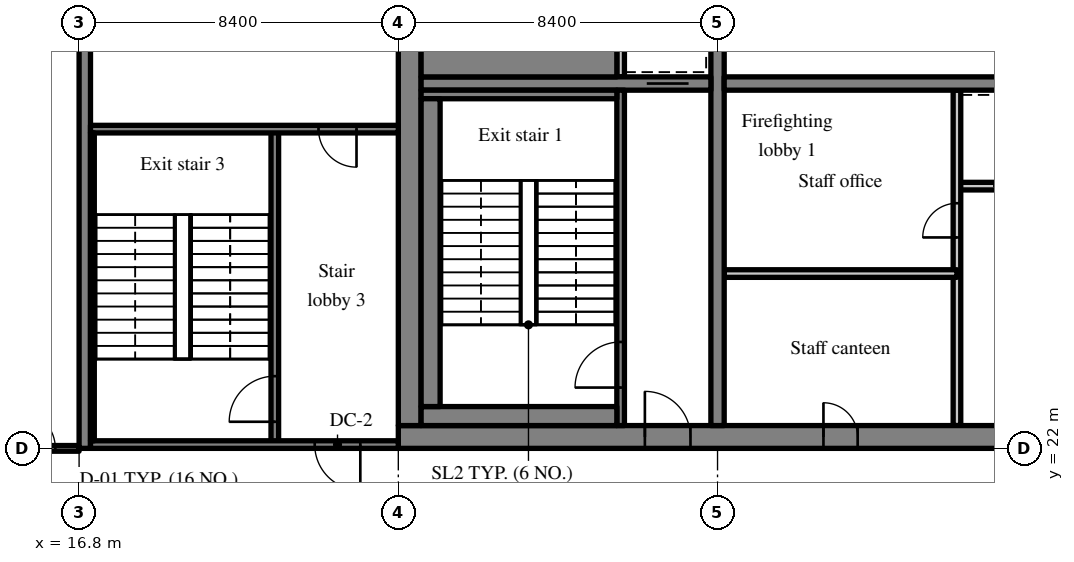
"""IFC4 building model, lengths in metres.
Left out: names, types, materials, properties, quantities, classifications, styles, units other than length and angle.
Written with IfcOpenShell. Run it as: python <this file> out.ifc"""

import sys

from ifc_helpers import new_model, si_unit, direction, frame, frame_2d, origin, place, context, subcontext, project, spatial, rectangle, extrude, source, transform, mapped, element, fill, save


model = new_model("IFC4")
c1 = context("Model", 3, precision=1e-05, world=origin(), true_north=direction((0.0, 1.0)))
c2 = subcontext(c1, "Body", "Model", "MODEL_VIEW")
j1 = project(units=[si_unit("LENGTHUNIT", "METRE"), si_unit("PLANEANGLEUNIT", "RADIAN")], contexts=[c1])
p1 = place(None, origin())
s1 = spatial("IfcSite", under=j1, at=p1, CompositionType="ELEMENT")
p2 = place(p1, origin())
s2 = spatial("IfcBuilding", under=s1, at=p2, CompositionType="ELEMENT")
p3 = place(p2, frame((0.0, 0.0, 229.6)))
s3 = spatial("IfcBuildingStorey", under=s2, at=p3, CompositionType="ELEMENT", Elevation=229.6)
m1 = source(origin(), c2, "Body", "SweptSolid", [
    extrude(rectangle(XDim=50.4, YDim=0.6, at=frame_2d((25.2, 0.0))), origin(), (0.0, 0.0, 1.0), 3.62),
])
p4 = place(p3, frame((25.2, 22.3, 0.0), z_axis=(0.0, 0.0, 1.0), x_axis=(1.0, 0.0, 0.0)))
e1 = element("IfcWall", 1, at=p4, inside=s3, PredefinedType="SHEAR", context=c2, shape_type="MappedRepresentation", body=[
    mapped(m1, transform((0.0, 0.0, 0.0), scale=1.0)),
])
m2 = source(origin(), c2, "Body", "SweptSolid", [
    extrude(rectangle(XDim=1.8, YDim=2.1, at=frame_2d((0.9, 1.05))), frame((0.0, 0.31, 0.0), z_axis=(0.0, -1.0, 0.0), x_axis=(1.0, 0.0, 0.0)), (0.0, 0.0, 1.0), 0.62),
])
p5 = place(p4, frame((15.9, 0.0, 0.0)))
e2 = element("IfcOpeningElement", 2, at=p5, cuts=e1, PredefinedType="OPENING", context=c2, shape_type="MappedRepresentation", body=[
    mapped(m2, transform((0.0, 0.0, 0.0), scale=1.0)),
])
m3 = source(origin(), c2, "Body", "SweptSolid", [
    extrude(rectangle(XDim=0.9, YDim=2.1, at=frame_2d((0.45, 1.05))), frame((0.0, 0.31, 0.0), z_axis=(0.0, -1.0, 0.0), x_axis=(1.0, 0.0, 0.0)), (0.0, 0.0, 1.0), 0.62),
])
p6 = place(p4, frame((11.187, 0.0, 0.0)))
e3 = element("IfcOpeningElement", 3, at=p6, cuts=e1, PredefinedType="OPENING", context=c2, shape_type="MappedRepresentation", body=[
    mapped(m3, transform((0.0, 0.0, 0.0), scale=1.0)),
])
p7 = place(p4, frame((21.513, 0.0, 0.0)))
e4 = element("IfcOpeningElement", 4, at=p7, cuts=e1, PredefinedType="OPENING", context=c2, shape_type="MappedRepresentation", body=[
    mapped(m3, transform((0.0, 0.0, 0.0), scale=1.0)),
])
p8 = place(p4, frame((32.7, 0.0, 0.0)))
e5 = element("IfcOpeningElement", 5, at=p8, cuts=e1, PredefinedType="OPENING", context=c2, shape_type="MappedRepresentation", body=[
    mapped(m2, transform((0.0, 0.0, 0.0), scale=1.0)),
])
m4 = source(origin(), c2, "Body", "SweptSolid", [
    extrude(rectangle(XDim=1.2, YDim=2.1, at=frame_2d((0.6, 1.05))), frame((0.0, 0.31, 0.0), z_axis=(0.0, -1.0, 0.0), x_axis=(1.0, 0.0, 0.0)), (0.0, 0.0, 1.0), 0.62),
])
p9 = place(p4, frame((6.488, 0.0, 0.0)))
e6 = element("IfcOpeningElement", 6, at=p9, cuts=e1, PredefinedType="OPENING", context=c2, shape_type="MappedRepresentation", body=[
    mapped(m4, transform((0.0, 0.0, 0.0), scale=1.0)),
])
p10 = place(p4, frame((47.925, 0.0, 0.0)))
e7 = element("IfcOpeningElement", 7, at=p10, cuts=e1, PredefinedType="OPENING", context=c2, shape_type="MappedRepresentation", body=[
    mapped(m4, transform((0.0, 0.0, 0.0), scale=1.0)),
])
m5 = source(origin(), c2, "Body", "SweptSolid", [
    extrude(rectangle(XDim=18.8, YDim=0.6, at=frame_2d((9.4, 0.0))), origin(), (0.0, 0.0, 1.0), 3.62),
])
p11 = place(p3, frame((25.5, 22.6, 0.0), z_axis=(0.0, 0.0, 1.0), x_axis=(0.0, 1.0, 0.0)))
e8 = element("IfcWall", 8, at=p11, inside=s3, PredefinedType="SHEAR", context=c2, shape_type="MappedRepresentation", body=[
    mapped(m5, transform((0.0, 0.0, 0.0), scale=1.0)),
])
m6 = source(origin(), c2, "Body", "SweptSolid", [
    extrude(rectangle(XDim=18.8, YDim=0.35, at=frame_2d((9.4, 0.0))), origin(), (0.0, 0.0, 1.0), 3.62),
])
p12 = place(p3, frame((33.6, 22.6, 0.0), z_axis=(0.0, 0.0, 1.0), x_axis=(0.0, 1.0, 0.0)))
e9 = element("IfcWall", 9, at=p12, inside=s3, PredefinedType="SHEAR", context=c2, shape_type="MappedRepresentation", body=[
    mapped(m6, transform((0.0, 0.0, 0.0), scale=1.0)),
])
m7 = source(origin(), c2, "Body", "SweptSolid", [
    extrude(rectangle(XDim=1.1, YDim=2.1, at=frame_2d((0.55, 1.05))), frame((0.0, 0.185, 0.0), z_axis=(0.0, -1.0, 0.0), x_axis=(1.0, 0.0, 0.0)), (0.0, 0.0, 1.0), 0.37),
])
p13 = place(p12, frame((12.85, 0.0, 0.0)))
e10 = element("IfcOpeningElement", 10, at=p13, cuts=e9, PredefinedType="OPENING", context=c2, shape_type="MappedRepresentation", body=[
    mapped(m7, transform((0.0, 0.0, 0.0), scale=1.0)),
])
m8 = source(origin(), c2, "Body", "SweptSolid", [
    extrude(rectangle(XDim=7.625, YDim=0.35, at=frame_2d((3.812, 0.0))), origin(), (0.0, 0.0, 1.0), 3.62),
])
p14 = place(p3, frame((25.8, 31.6, 0.0), z_axis=(0.0, 0.0, 1.0), x_axis=(1.0, 0.0, 0.0)))
e11 = element("IfcWall", 11, at=p14, inside=s3, PredefinedType="SHEAR", context=c2, shape_type="MappedRepresentation", body=[
    mapped(m8, transform((0.0, 0.0, 0.0), scale=1.0)),
])
p15 = place(p14, frame((5.938, 0.0, 0.0)))
e12 = element("IfcOpeningElement", 12, at=p15, cuts=e11, PredefinedType="OPENING", context=c2, shape_type="MappedRepresentation", body=[
    mapped(m7, transform((0.0, 0.0, 0.0), scale=1.0)),
])
m9 = source(origin(), c2, "Body", "SweptSolid", [
    extrude(rectangle(XDim=16.45, YDim=0.35, at=frame_2d((8.225, 0.0))), origin(), (0.0, 0.0, 1.0), 3.62),
])
p16 = place(p3, frame((33.775, 31.6, 0.0), z_axis=(0.0, 0.0, 1.0), x_axis=(1.0, 0.0, 0.0)))
e13 = element("IfcWall", 13, at=p16, inside=s3, PredefinedType="SHEAR", context=c2, shape_type="MappedRepresentation", body=[
    mapped(m9, transform((0.0, 0.0, 0.0), scale=1.0)),
])
m10 = source(origin(), c2, "Body", "SweptSolid", [
    extrude(rectangle(XDim=1.0, YDim=2.1, at=frame_2d((0.5, 1.05))), frame((0.0, 0.185, 0.0), z_axis=(0.0, -1.0, 0.0), x_axis=(1.0, 0.0, 0.0)), (0.0, 0.0, 1.0), 0.37),
])
p17 = place(p16, frame((14.837, 0.0, 0.0)))
e14 = element("IfcOpeningElement", 14, at=p17, cuts=e13, PredefinedType="OPENING", context=c2, shape_type="MappedRepresentation", body=[
    mapped(m10, transform((0.0, 0.0, 0.0), scale=1.0)),
])
m11 = source(origin(), c2, "Body", "SweptSolid", [
    extrude(rectangle(XDim=18.4, YDim=0.3, at=frame_2d((9.2, 0.0))), origin(), (0.0, 0.0, 1.0), 3.62),
])
p18 = place(p3, frame((16.95, 22.0, 0.0), z_axis=(0.0, 0.0, 1.0), x_axis=(0.0, 1.0, 0.0)))
e15 = element("IfcWall", 15, at=p18, inside=s3, PredefinedType="SHEAR", context=c2, shape_type="MappedRepresentation", body=[
    mapped(m11, transform((0.0, 0.0, 0.0), scale=1.0)),
])
m12 = source(origin(), c2, "Body", "SweptSolid", [
    extrude(rectangle(XDim=6.0, YDim=0.2, at=frame_2d((3.0, 0.0))), origin(), (0.0, 0.0, 1.0), 3.62),
])
p19 = place(p3, frame((39.9, 28.9, 0.0), z_axis=(0.0, 0.0, 1.0), x_axis=(1.0, 0.0, 0.0)))
e16 = element("IfcWall", 16, at=p19, inside=s3, PredefinedType="SOLIDWALL", context=c2, shape_type="MappedRepresentation", body=[
    mapped(m12, transform((0.0, 0.0, 0.0), scale=1.0)),
])
m13 = source(origin(), c2, "Body", "SweptSolid", [
    extrude(rectangle(XDim=1.1, YDim=2.1, at=frame_2d((0.55, 1.05))), frame((0.0, 0.11, 0.0), z_axis=(0.0, -1.0, 0.0), x_axis=(1.0, 0.0, 0.0)), (0.0, 0.0, 1.0), 0.22),
])
p20 = place(p19, frame((0.95, 0.0, 0.0)))
e17 = element("IfcOpeningElement", 17, at=p20, cuts=e16, PredefinedType="OPENING", context=c2, shape_type="MappedRepresentation", body=[
    mapped(m13, transform((0.0, 0.0, 0.0), scale=1.0)),
])
p21 = place(p19, frame((3.95, 0.0, 0.0)))
e18 = element("IfcOpeningElement", 18, at=p21, cuts=e16, PredefinedType="OPENING", context=c2, shape_type="MappedRepresentation", body=[
    mapped(m13, transform((0.0, 0.0, 0.0), scale=1.0)),
])
m14 = source(origin(), c2, "Body", "SweptSolid", [
    extrude(rectangle(XDim=8.825, YDim=0.2, at=frame_2d((4.413, 0.0))), origin(), (0.0, 0.0, 1.0), 3.62),
])
p22 = place(p3, frame((39.9, 22.6, 0.0), z_axis=(0.0, 0.0, 1.0), x_axis=(0.0, 1.0, 0.0)))
e19 = element("IfcWall", 19, at=p22, inside=s3, PredefinedType="PARTITIONING", context=c2, shape_type="MappedRepresentation", body=[
    mapped(m14, transform((0.0, 0.0, 0.0), scale=1.0)),
])
m15 = source(origin(), c2, "Body", "SweptSolid", [
    extrude(rectangle(XDim=0.9, YDim=2.1, at=frame_2d((0.45, 1.05))), frame((0.0, 0.11, 0.0), z_axis=(0.0, -1.0, 0.0), x_axis=(1.0, 0.0, 0.0)), (0.0, 0.0, 1.0), 0.22),
])
p23 = place(p22, frame((4.95, 0.0, 0.0)))
e20 = element("IfcOpeningElement", 20, at=p23, cuts=e19, PredefinedType="OPENING", context=c2, shape_type="MappedRepresentation", body=[
    mapped(m15, transform((0.0, 0.0, 0.0), scale=1.0)),
])
m16 = source(origin(), c2, "Body", "SweptSolid", [
    extrude(rectangle(XDim=6.125, YDim=0.2, at=frame_2d((3.062, 0.0))), origin(), (0.0, 0.0, 1.0), 3.62),
])
p24 = place(p3, frame((33.775, 26.6, 0.0), z_axis=(0.0, 0.0, 1.0), x_axis=(1.0, 0.0, 0.0)))
e21 = element("IfcWall", 21, at=p24, inside=s3, PredefinedType="PARTITIONING", context=c2, shape_type="MappedRepresentation", body=[
    mapped(m16, transform((0.0, 0.0, 0.0), scale=1.0)),
])
m17 = source(origin(), c2, "Body", "SweptSolid", [
    extrude(rectangle(XDim=8.825, YDim=0.2, at=frame_2d((4.413, 0.0))), origin(), (0.0, 0.0, 1.0), 3.62),
])
p25 = place(p3, frame((31.05, 22.6, 0.0), z_axis=(0.0, 0.0, 1.0), x_axis=(0.0, 1.0, 0.0)))
e22 = element("IfcWall", 22, at=p25, inside=s3, PredefinedType="SOLIDWALL", context=c2, shape_type="MappedRepresentation", body=[
    mapped(m17, transform((0.0, 0.0, 0.0), scale=1.0)),
])
m18 = source(origin(), c2, "Body", "SweptSolid", [
    extrude(rectangle(XDim=1.2, YDim=2.1, at=frame_2d((0.6, 1.05))), frame((0.0, 0.11, 0.0), z_axis=(0.0, -1.0, 0.0), x_axis=(1.0, 0.0, 0.0)), (0.0, 0.0, 1.0), 0.22),
])
p26 = place(p25, frame((1.0, 0.0, 0.0)))
e23 = element("IfcOpeningElement", 23, at=p26, cuts=e22, PredefinedType="OPENING", context=c2, shape_type="MappedRepresentation", body=[
    mapped(m18, transform((0.0, 0.0, 0.0), scale=1.0)),
])
m19 = source(origin(), c2, "Body", "SweptSolid", [
    extrude(rectangle(XDim=1.825, YDim=0.2, at=frame_2d((0.913, 0.0))), origin(), (0.0, 0.0, 1.0), 3.62),
])
p27 = place(p3, frame((31.05, 31.775, 0.0), z_axis=(0.0, 0.0, 1.0), x_axis=(0.0, 1.0, 0.0)))
e24 = element("IfcWall", 24, at=p27, inside=s3, PredefinedType="SOLIDWALL", context=c2, shape_type="MappedRepresentation", body=[
    mapped(m19, transform((0.0, 0.0, 0.0), scale=1.0)),
])
m20 = source(origin(), c2, "Body", "SweptSolid", [
    extrude(rectangle(XDim=8.3, YDim=0.2, at=frame_2d((4.15, 0.0))), origin(), (0.0, 0.0, 1.0), 3.62),
])
p28 = place(p3, frame((21.95, 22.1, 0.0), z_axis=(0.0, 0.0, 1.0), x_axis=(0.0, 1.0, 0.0)))
e25 = element("IfcWall", 25, at=p28, inside=s3, PredefinedType="SOLIDWALL", context=c2, shape_type="MappedRepresentation", body=[
    mapped(m20, transform((0.0, 0.0, 0.0), scale=1.0)),
])
p29 = place(p28, frame((0.6, 0.0, 0.0)))
e26 = element("IfcOpeningElement", 26, at=p29, cuts=e25, PredefinedType="OPENING", context=c2, shape_type="MappedRepresentation", body=[
    mapped(m18, transform((0.0, 0.0, 0.0), scale=1.0)),
])
m21 = source(origin(), c2, "Body", "SweptSolid", [
    extrude(rectangle(XDim=8.1, YDim=0.2, at=frame_2d((4.05, 0.0))), origin(), (0.0, 0.0, 1.0), 3.62),
])
p30 = place(p3, frame((17.1, 22.1, 0.0), z_axis=(0.0, 0.0, 1.0), x_axis=(1.0, 0.0, 0.0)))
e27 = element("IfcWall", 27, at=p30, inside=s3, PredefinedType="SOLIDWALL", context=c2, shape_type="MappedRepresentation", body=[
    mapped(m21, transform((0.0, 0.0, 0.0), scale=1.0)),
])
p31 = place(p30, frame((5.9, 0.0, 0.0)))
e28 = element("IfcOpeningElement", 28, at=p31, cuts=e27, PredefinedType="OPENING", context=c2, shape_type="MappedRepresentation", body=[
    mapped(m18, transform((0.0, 0.0, 0.0), scale=1.0)),
])
p32 = place(p3, frame((17.1, 30.4, 0.0), z_axis=(0.0, 0.0, 1.0), x_axis=(1.0, 0.0, 0.0)))
e29 = element("IfcWall", 29, at=p32, inside=s3, PredefinedType="SOLIDWALL", context=c2, shape_type="MappedRepresentation", body=[
    mapped(m21, transform((0.0, 0.0, 0.0), scale=1.0)),
])
m22 = source(origin(), c2, "Body", "SweptSolid", [
    extrude(rectangle(XDim=1.0, YDim=2.1, at=frame_2d((0.5, 1.05))), frame((0.0, 0.11, 0.0), z_axis=(0.0, -1.0, 0.0), x_axis=(1.0, 0.0, 0.0)), (0.0, 0.0, 1.0), 0.22),
])
p33 = place(p32, frame((6.0, 0.0, 0.0)))
e30 = element("IfcOpeningElement", 30, at=p33, cuts=e29, PredefinedType="OPENING", context=c2, shape_type="MappedRepresentation", body=[
    mapped(m22, transform((0.0, 0.0, 0.0), scale=1.0)),
])
m23 = source(origin(), c2, "Body", "SweptSolid", [
    extrude(rectangle(XDim=5.15, YDim=0.5, at=frame_2d((2.575, 0.0))), origin(), (0.0, 0.0, 1.0), 3.62),
])
p34 = place(p3, frame((25.8, 22.85, 0.0), z_axis=(0.0, 0.0, 1.0), x_axis=(1.0, 0.0, 0.0)))
e31 = element("IfcWall", 31, at=p34, inside=s3, PredefinedType="SOLIDWALL", context=c2, shape_type="MappedRepresentation", body=[
    mapped(m23, transform((0.0, 0.0, 0.0), scale=1.0)),
])
m24 = source(origin(), c2, "Body", "SweptSolid", [
    extrude(rectangle(XDim=5.15, YDim=0.225, at=frame_2d((2.575, 0.0))), origin(), (0.0, 0.0, 1.0), 3.62),
])
p35 = place(p3, frame((25.8, 31.312, 0.0), z_axis=(0.0, 0.0, 1.0), x_axis=(1.0, 0.0, 0.0)))
e32 = element("IfcWall", 32, at=p35, inside=s3, PredefinedType="SOLIDWALL", context=c2, shape_type="MappedRepresentation", body=[
    mapped(m24, transform((0.0, 0.0, 0.0), scale=1.0)),
])
m25 = source(origin(), c2, "Body", "SweptSolid", [
    extrude(rectangle(XDim=8.1, YDim=0.5, at=frame_2d((4.05, 0.0))), origin(), (0.0, 0.0, 1.0), 3.62),
])
p36 = place(p3, frame((26.05, 23.1, 0.0), z_axis=(0.0, 0.0, 1.0), x_axis=(0.0, 1.0, 0.0)))
e33 = element("IfcWall", 33, at=p36, inside=s3, PredefinedType="SOLIDWALL", context=c2, shape_type="MappedRepresentation", body=[
    mapped(m25, transform((0.0, 0.0, 0.0), scale=1.0)),
])
m26 = source(origin(), c2, "Body", "SweptSolid", [
    extrude(rectangle(XDim=8.1, YDim=0.1, at=frame_2d((4.05, 0.0))), origin(), (0.0, 0.0, 1.0), 3.62),
])
p37 = place(p3, frame((17.15, 22.2, 0.0), z_axis=(0.0, 0.0, 1.0), x_axis=(0.0, 1.0, 0.0)))
e34 = element("IfcWall", 34, at=p37, inside=s3, PredefinedType="SOLIDWALL", context=c2, shape_type="MappedRepresentation", body=[
    mapped(m26, transform((0.0, 0.0, 0.0), scale=1.0)),
])
m27 = source(origin(), c2, "Body", "SweptSolid", [
    extrude(rectangle(XDim=5.15, YDim=1.025, at=frame_2d((2.575, 0.0))), origin(), (0.0, 0.0, 1.0), 3.62),
])
p38 = place(p3, frame((25.8, 32.287, 0.0), z_axis=(0.0, 0.0, 1.0), x_axis=(1.0, 0.0, 0.0)))
e35 = element("IfcWall", 35, at=p38, inside=s3, PredefinedType="SOLIDWALL", context=c2, shape_type="MappedRepresentation", body=[
    mapped(m27, transform((0.0, 0.0, 0.0), scale=1.0)),
])
m28 = source(origin(), c2, "Body", "SweptSolid", [
    extrude(rectangle(XDim=1.9, YDim=0.15, at=frame_2d((0.95, 0.0))), origin(), (0.0, 0.0, 1.0), 2.92),
])
p39 = place(p3, frame((14.9, 22.0, 0.0), z_axis=(0.0, 0.0, 1.0), x_axis=(1.0, 0.0, 0.0)))
e36 = element("IfcWall", 36, at=p39, inside=s3, PredefinedType="PARTITIONING", context=c2, shape_type="MappedRepresentation", body=[
    mapped(m28, transform((0.0, 0.0, 0.0), scale=1.0)),
])
m29 = source(origin(), c2, "Body", "SweptSolid", [
    extrude(rectangle(XDim=1.0, YDim=2.1, at=frame_2d((0.5, 1.05))), frame((0.0, 0.085, 0.0), z_axis=(0.0, -1.0, 0.0), x_axis=(1.0, 0.0, 0.0)), (0.0, 0.0, 1.0), 0.17),
])
p40 = place(p39, frame((0.275, 0.0, 0.0)))
e37 = element("IfcOpeningElement", 37, at=p40, cuts=e36, PredefinedType="OPENING", context=c2, shape_type="MappedRepresentation", body=[
    mapped(m29, transform((0.0, 0.0, 0.0), scale=1.0)),
])
m30 = source(origin(), c2, "Body", "SweptSolid", [
    extrude(rectangle(XDim=1.1, YDim=2.1, at=frame_2d((0.55, 1.05))), frame((0.0, 0.025, 0.0), z_axis=(0.0, -1.0, 0.0), x_axis=(1.0, 0.0, 0.0)), (0.0, 0.0, 1.0), 0.05),
])
p41 = place(p20, origin())
e38 = element("IfcDoor", 38, at=p41, inside=s3, OperationType="SLIDING_TO_LEFT", PredefinedType="DOOR", context=c2, shape_type="MappedRepresentation", body=[
    mapped(m30, transform((0.0, 0.0, 0.0), scale=1.0)),
])
fill(e17, e38)
m31 = source(origin(), c2, "Body", "SweptSolid", [
    extrude(rectangle(XDim=0.9, YDim=2.1, at=frame_2d((0.45, 1.05))), frame((0.0, 0.225, 0.0), z_axis=(0.0, -1.0, 0.0), x_axis=(1.0, 0.0, 0.0)), (0.0, 0.0, 1.0), 0.05),
])
p42 = place(p6, origin())
e39 = element("IfcDoor", 39, at=p42, inside=s3, OperationType="SINGLE_SWING_LEFT", PredefinedType="DOOR", context=c2, shape_type="MappedRepresentation", body=[
    mapped(m31, transform((0.0, 0.0, 0.0), scale=1.0)),
])
fill(e3, e39)
m32 = source(origin(), c2, "Body", "SweptSolid", [
    extrude(rectangle(XDim=0.9, YDim=2.1, at=frame_2d((0.45, 1.05))), frame((0.0, 0.025, 0.0), z_axis=(0.0, -1.0, 0.0), x_axis=(1.0, 0.0, 0.0)), (0.0, 0.0, 1.0), 0.05),
])
p43 = place(p23, origin())
e40 = element("IfcDoor", 40, at=p43, inside=s3, OperationType="SINGLE_SWING_LEFT", PredefinedType="DOOR", context=c2, shape_type="MappedRepresentation", body=[
    mapped(m32, transform((0.0, 0.0, 0.0), scale=1.0)),
])
fill(e20, e40)
m33 = source(origin(), c2, "Body", "SweptSolid", [
    extrude(rectangle(XDim=1.2, YDim=2.1, at=frame_2d((0.6, 1.05))), frame((0.0, 0.025, 0.0), z_axis=(0.0, -1.0, 0.0), x_axis=(1.0, 0.0, 0.0)), (0.0, 0.0, 1.0), 0.05),
])
p44 = place(p26, origin())
e41 = element("IfcDoor", 41, at=p44, inside=s3, OperationType="SINGLE_SWING_LEFT", PredefinedType="DOOR", context=c2, shape_type="MappedRepresentation", body=[
    mapped(m33, transform((0.0, 0.0, 0.0), scale=1.0)),
])
fill(e23, e41)
m34 = source(origin(), c2, "Body", "SweptSolid", [
    extrude(rectangle(XDim=1.2, YDim=2.1, at=frame_2d((0.6, 1.05))), frame((0.0, 0.225, 0.0), z_axis=(0.0, -1.0, 0.0), x_axis=(1.0, 0.0, 0.0)), (0.0, 0.0, 1.0), 0.05),
])
p45 = place(p9, origin())
e42 = element("IfcDoor", 42, at=p45, inside=s3, OperationType="SINGLE_SWING_LEFT", PredefinedType="DOOR", context=c2, shape_type="MappedRepresentation", body=[
    mapped(m34, transform((0.0, 0.0, 0.0), scale=1.0)),
])
fill(e6, e42)
p46 = place(p15, origin())
e43 = element("IfcDoor", 43, at=p46, inside=s3, OperationType="SLIDING_TO_LEFT", PredefinedType="DOOR", context=c2, shape_type="MappedRepresentation", body=[
    mapped(m30, transform((0.0, 0.0, 0.0), scale=1.0)),
])
fill(e12, e43)
p47 = place(p29, origin())
e44 = element("IfcDoor", 44, at=p47, inside=s3, OperationType="SINGLE_SWING_LEFT", PredefinedType="DOOR", context=c2, shape_type="MappedRepresentation", body=[
    mapped(m33, transform((0.0, 0.0, 0.0), scale=1.0)),
])
fill(e26, e44)
p48 = place(p31, origin())
e45 = element("IfcDoor", 45, at=p48, inside=s3, OperationType="SINGLE_SWING_RIGHT", PredefinedType="DOOR", context=c2, shape_type="MappedRepresentation", body=[
    mapped(m33, transform((0.0, 0.0, 0.0), scale=1.0)),
])
fill(e28, e45)
m35 = source(origin(), c2, "Body", "SweptSolid", [
    extrude(rectangle(XDim=1.0, YDim=2.1, at=frame_2d((0.5, 1.05))), frame((0.0, 0.025, 0.0), z_axis=(0.0, -1.0, 0.0), x_axis=(1.0, 0.0, 0.0)), (0.0, 0.0, 1.0), 0.05),
])
p49 = place(p33, origin())
e46 = element("IfcDoor", 46, at=p49, inside=s3, OperationType="SINGLE_SWING_RIGHT", PredefinedType="DOOR", context=c2, shape_type="MappedRepresentation", body=[
    mapped(m35, transform((0.0, 0.0, 0.0), scale=1.0)),
])
fill(e30, e46)
p50 = place(p40, origin())
e47 = element("IfcDoor", 47, at=p50, inside=s3, OperationType="SINGLE_SWING_LEFT", PredefinedType="DOOR", context=c2, shape_type="MappedRepresentation", body=[
    mapped(m35, transform((0.0, 0.0, 0.0), scale=1.0)),
])
fill(e37, e47)
save(model, sys.argv[1])
